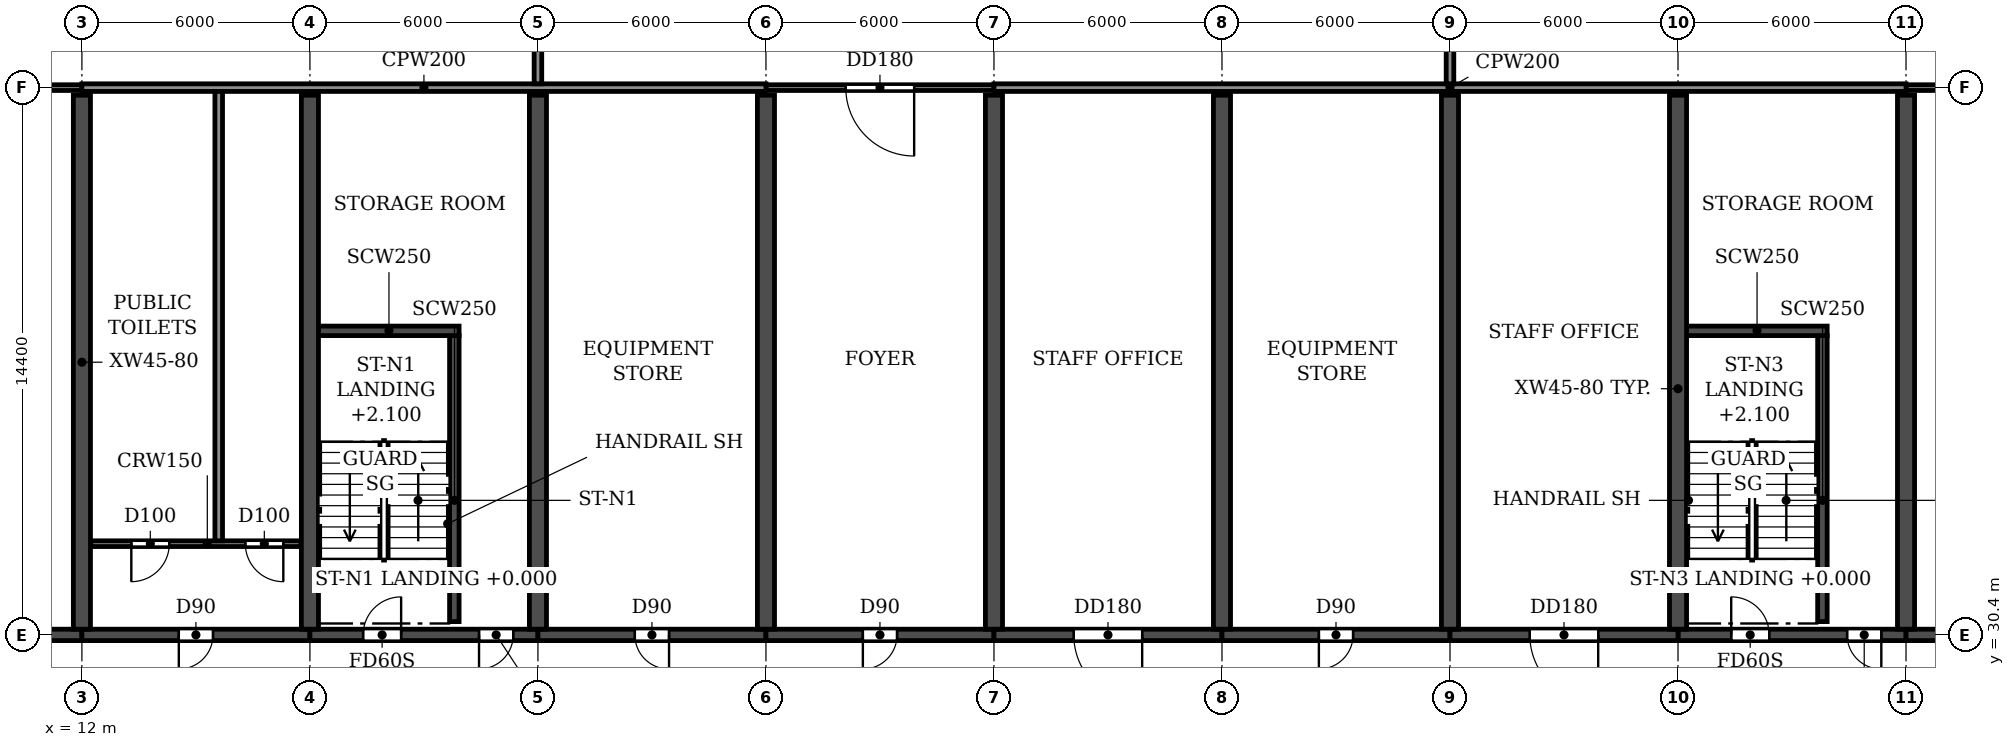
"""IFC4 building model, lengths in metres.
Left out: names, types, materials, properties, quantities, classifications, styles, units other than length and angle.
Written with IfcOpenShell. Run it as: python <this file> out.ifc"""

import sys

from ifc_helpers import new_model, si_unit, direction, frame, frame_2d, origin, place, context, subcontext, project, spatial, rectangle, extrude, element, fill, save


model = new_model("IFC4")
c1 = context("Model", 3, precision=1e-05, world=origin(), true_north=direction((0.0, 1.0)))
c2 = subcontext(c1, "Body", "Model", "MODEL_VIEW")
j1 = project(units=[si_unit("LENGTHUNIT", "METRE"), si_unit("PLANEANGLEUNIT", "RADIAN")], contexts=[c1])
p1 = place(None, origin())
s1 = spatial("IfcSite", under=j1, at=p1, CompositionType="ELEMENT")
p2 = place(p1, origin())
s2 = spatial("IfcBuilding", under=s1, at=p2, CompositionType="ELEMENT")
p3 = place(p2, frame((0.0, 0.0, 15.0)))
s3 = spatial("IfcBuildingStorey", under=s2, at=p3, CompositionType="ELEMENT", Elevation=15.0)
for number, where, z_axis, x_axis in (
    (1, (12.0, 30.55, 0.0), (0.0, 0.0, 1.0), (0.0, 1.0, 0.0)),
    (2, (18.0, 30.55, 0.0), (0.0, 0.0, 1.0), (0.0, 1.0, 0.0)),
    (3, (24.0, 30.55, 0.0), (0.0, 0.0, 1.0), (0.0, 1.0, 0.0)),
    (4, (30.0, 30.55, 0.0), (0.0, 0.0, 1.0), (0.0, 1.0, 0.0)),
    (5, (36.0, 30.55, 0.0), (0.0, 0.0, 1.0), (0.0, 1.0, 0.0)),
    (6, (42.0, 30.55, 0.0), (0.0, 0.0, 1.0), (0.0, 1.0, 0.0)),
    (7, (48.0, 30.55, 0.0), (0.0, 0.0, 1.0), (0.0, 1.0, 0.0)),
    (8, (54.0, 30.55, 0.0), (0.0, 0.0, 1.0), (0.0, 1.0, 0.0)),
    (9, (60.0, 30.55, 0.0), (0.0, 0.0, 1.0), (0.0, 1.0, 0.0)),
):
    element("IfcWall", number, at=place(p3, frame(where, z_axis=z_axis, x_axis=x_axis)), inside=s3, PredefinedType="SHEAR", context=c2, shape_type="SweptSolid", body=[
        extrude(rectangle(XDim=14.05, YDim=0.45, at=frame_2d((7.025, 0.0))), origin(), (0.0, 0.0, 1.0), 3.92),
    ])
p4 = place(p3, frame((6.0, 30.4, 0.0), z_axis=(0.0, 0.0, 1.0), x_axis=(1.0, 0.0, 0.0)))
e10 = element("IfcWall", 10, at=p4, inside=s3, PredefinedType="SHEAR", context=c2, shape_type="SweptSolid", body=[
    extrude(rectangle(XDim=6.0, YDim=0.3, at=frame_2d((3.0, 0.0))), origin(), (0.0, 0.0, 1.0), 3.32),
])
p5 = place(p4, frame((2.55, 0.0, 0.0)))
e11 = element("IfcOpeningElement", 11, at=p5, cuts=e10, PredefinedType="OPENING", context=c2, shape_type="SweptSolid", body=[
    extrude(rectangle(XDim=0.9, YDim=2.1, at=frame_2d((0.45, 1.05))), frame((0.0, 0.16, 0.0), z_axis=(0.0, -1.0, 0.0), x_axis=(1.0, 0.0, 0.0)), (0.0, 0.0, 1.0), 0.32),
])
p6 = place(p3, frame((12.0, 30.4, 0.0), z_axis=(0.0, 0.0, 1.0), x_axis=(1.0, 0.0, 0.0)))
e12 = element("IfcWall", 12, at=p6, inside=s3, PredefinedType="SHEAR", context=c2, shape_type="SweptSolid", body=[
    extrude(rectangle(XDim=6.0, YDim=0.3, at=frame_2d((3.0, 0.0))), origin(), (0.0, 0.0, 1.0), 3.32),
])
p7 = place(p6, frame((2.55, 0.0, 0.0)))
e13 = element("IfcOpeningElement", 13, at=p7, cuts=e12, PredefinedType="OPENING", context=c2, shape_type="SweptSolid", body=[
    extrude(rectangle(XDim=0.9, YDim=2.1, at=frame_2d((0.45, 1.05))), frame((0.0, 0.16, 0.0), z_axis=(0.0, -1.0, 0.0), x_axis=(1.0, 0.0, 0.0)), (0.0, 0.0, 1.0), 0.32),
])
p8 = place(p3, frame((18.0, 30.4, 0.0), z_axis=(0.0, 0.0, 1.0), x_axis=(1.0, 0.0, 0.0)))
e14 = element("IfcWall", 14, at=p8, inside=s3, PredefinedType="SHEAR", context=c2, shape_type="SweptSolid", body=[
    extrude(rectangle(XDim=6.0, YDim=0.3, at=frame_2d((3.0, 0.0))), origin(), (0.0, 0.0, 1.0), 3.32),
])
p9 = place(p8, frame((1.4, 0.0, 0.0)))
e15 = element("IfcOpeningElement", 15, at=p9, cuts=e14, PredefinedType="OPENING", context=c2, shape_type="SweptSolid", body=[
    extrude(rectangle(XDim=1.0, YDim=2.1, at=frame_2d((0.5, 1.05))), frame((0.0, 0.16, 0.0), z_axis=(0.0, -1.0, 0.0), x_axis=(1.0, 0.0, 0.0)), (0.0, 0.0, 1.0), 0.32),
])
p10 = place(p8, frame((4.45, 0.0, 0.0)))
e16 = element("IfcOpeningElement", 16, at=p10, cuts=e14, PredefinedType="OPENING", context=c2, shape_type="SweptSolid", body=[
    extrude(rectangle(XDim=0.9, YDim=2.1, at=frame_2d((0.45, 1.05))), frame((0.0, 0.16, 0.0), z_axis=(0.0, -1.0, 0.0), x_axis=(1.0, 0.0, 0.0)), (0.0, 0.0, 1.0), 0.32),
])
p11 = place(p3, frame((24.0, 30.4, 0.0), z_axis=(0.0, 0.0, 1.0), x_axis=(1.0, 0.0, 0.0)))
e17 = element("IfcWall", 17, at=p11, inside=s3, PredefinedType="SHEAR", context=c2, shape_type="SweptSolid", body=[
    extrude(rectangle(XDim=6.0, YDim=0.3, at=frame_2d((3.0, 0.0))), origin(), (0.0, 0.0, 1.0), 3.32),
])
p12 = place(p11, frame((2.55, 0.0, 0.0)))
e18 = element("IfcOpeningElement", 18, at=p12, cuts=e17, PredefinedType="OPENING", context=c2, shape_type="SweptSolid", body=[
    extrude(rectangle(XDim=0.9, YDim=2.1, at=frame_2d((0.45, 1.05))), frame((0.0, 0.16, 0.0), z_axis=(0.0, -1.0, 0.0), x_axis=(1.0, 0.0, 0.0)), (0.0, 0.0, 1.0), 0.32),
])
p13 = place(p3, frame((30.0, 30.4, 0.0), z_axis=(0.0, 0.0, 1.0), x_axis=(1.0, 0.0, 0.0)))
e19 = element("IfcWall", 19, at=p13, inside=s3, PredefinedType="SHEAR", context=c2, shape_type="SweptSolid", body=[
    extrude(rectangle(XDim=6.0, YDim=0.3, at=frame_2d((3.0, 0.0))), origin(), (0.0, 0.0, 1.0), 3.32),
])
p14 = place(p13, frame((2.55, 0.0, 0.0)))
e20 = element("IfcOpeningElement", 20, at=p14, cuts=e19, PredefinedType="OPENING", context=c2, shape_type="SweptSolid", body=[
    extrude(rectangle(XDim=0.9, YDim=2.1, at=frame_2d((0.45, 1.05))), frame((0.0, 0.16, 0.0), z_axis=(0.0, -1.0, 0.0), x_axis=(1.0, 0.0, 0.0)), (0.0, 0.0, 1.0), 0.32),
])
p15 = place(p3, frame((36.0, 30.4, 0.0), z_axis=(0.0, 0.0, 1.0), x_axis=(1.0, 0.0, 0.0)))
e21 = element("IfcWall", 21, at=p15, inside=s3, PredefinedType="SHEAR", context=c2, shape_type="SweptSolid", body=[
    extrude(rectangle(XDim=6.0, YDim=0.3, at=frame_2d((3.0, 0.0))), origin(), (0.0, 0.0, 1.0), 3.32),
])
p16 = place(p15, frame((2.1, 0.0, 0.0)))
e22 = element("IfcOpeningElement", 22, at=p16, cuts=e21, PredefinedType="OPENING", context=c2, shape_type="SweptSolid", body=[
    extrude(rectangle(XDim=1.8, YDim=2.1, at=frame_2d((0.9, 1.05))), frame((0.0, 0.16, 0.0), z_axis=(0.0, -1.0, 0.0), x_axis=(1.0, 0.0, 0.0)), (0.0, 0.0, 1.0), 0.32),
])
p17 = place(p3, frame((42.0, 30.4, 0.0), z_axis=(0.0, 0.0, 1.0), x_axis=(1.0, 0.0, 0.0)))
e23 = element("IfcWall", 23, at=p17, inside=s3, PredefinedType="SHEAR", context=c2, shape_type="SweptSolid", body=[
    extrude(rectangle(XDim=6.0, YDim=0.3, at=frame_2d((3.0, 0.0))), origin(), (0.0, 0.0, 1.0), 3.32),
])
p18 = place(p17, frame((2.55, 0.0, 0.0)))
e24 = element("IfcOpeningElement", 24, at=p18, cuts=e23, PredefinedType="OPENING", context=c2, shape_type="SweptSolid", body=[
    extrude(rectangle(XDim=0.9, YDim=2.1, at=frame_2d((0.45, 1.05))), frame((0.0, 0.16, 0.0), z_axis=(0.0, -1.0, 0.0), x_axis=(1.0, 0.0, 0.0)), (0.0, 0.0, 1.0), 0.32),
])
p19 = place(p3, frame((48.0, 30.4, 0.0), z_axis=(0.0, 0.0, 1.0), x_axis=(1.0, 0.0, 0.0)))
e25 = element("IfcWall", 25, at=p19, inside=s3, PredefinedType="SHEAR", context=c2, shape_type="SweptSolid", body=[
    extrude(rectangle(XDim=6.0, YDim=0.3, at=frame_2d((3.0, 0.0))), origin(), (0.0, 0.0, 1.0), 3.32),
])
p20 = place(p19, frame((2.1, 0.0, 0.0)))
e26 = element("IfcOpeningElement", 26, at=p20, cuts=e25, PredefinedType="OPENING", context=c2, shape_type="SweptSolid", body=[
    extrude(rectangle(XDim=1.8, YDim=2.1, at=frame_2d((0.9, 1.05))), frame((0.0, 0.16, 0.0), z_axis=(0.0, -1.0, 0.0), x_axis=(1.0, 0.0, 0.0)), (0.0, 0.0, 1.0), 0.32),
])
p21 = place(p3, frame((54.0, 30.4, 0.0), z_axis=(0.0, 0.0, 1.0), x_axis=(1.0, 0.0, 0.0)))
e27 = element("IfcWall", 27, at=p21, inside=s3, PredefinedType="SHEAR", context=c2, shape_type="SweptSolid", body=[
    extrude(rectangle(XDim=6.0, YDim=0.3, at=frame_2d((3.0, 0.0))), origin(), (0.0, 0.0, 1.0), 3.32),
])
p22 = place(p21, frame((1.4, 0.0, 0.0)))
e28 = element("IfcOpeningElement", 28, at=p22, cuts=e27, PredefinedType="OPENING", context=c2, shape_type="SweptSolid", body=[
    extrude(rectangle(XDim=1.0, YDim=2.1, at=frame_2d((0.5, 1.05))), frame((0.0, 0.16, 0.0), z_axis=(0.0, -1.0, 0.0), x_axis=(1.0, 0.0, 0.0)), (0.0, 0.0, 1.0), 0.32),
])
p23 = place(p21, frame((4.45, 0.0, 0.0)))
e29 = element("IfcOpeningElement", 29, at=p23, cuts=e27, PredefinedType="OPENING", context=c2, shape_type="SweptSolid", body=[
    extrude(rectangle(XDim=0.9, YDim=2.1, at=frame_2d((0.45, 1.05))), frame((0.0, 0.16, 0.0), z_axis=(0.0, -1.0, 0.0), x_axis=(1.0, 0.0, 0.0)), (0.0, 0.0, 1.0), 0.32),
])
p24 = place(p3, frame((60.0, 30.4, 0.0), z_axis=(0.0, 0.0, 1.0), x_axis=(1.0, 0.0, 0.0)))
e30 = element("IfcWall", 30, at=p24, inside=s3, PredefinedType="SHEAR", context=c2, shape_type="SweptSolid", body=[
    extrude(rectangle(XDim=6.0, YDim=0.3, at=frame_2d((3.0, 0.0))), origin(), (0.0, 0.0, 1.0), 3.32),
])
p25 = place(p24, frame((2.55, 0.0, 0.0)))
e31 = element("IfcOpeningElement", 31, at=p25, cuts=e30, PredefinedType="OPENING", context=c2, shape_type="SweptSolid", body=[
    extrude(rectangle(XDim=0.9, YDim=2.1, at=frame_2d((0.45, 1.05))), frame((0.0, 0.16, 0.0), z_axis=(0.0, -1.0, 0.0), x_axis=(1.0, 0.0, 0.0)), (0.0, 0.0, 1.0), 0.32),
])
p26 = place(p3, frame((21.8, 30.75, 0.0), z_axis=(0.0, 0.0, 1.0), x_axis=(0.0, 1.0, 0.0)))
e32 = element("IfcWall", 32, at=p26, inside=s3, PredefinedType="SOLIDWALL", context=c2, shape_type="SweptSolid", body=[
    extrude(rectangle(XDim=7.525, YDim=0.25, at=frame_2d((3.762, 0.0))), origin(), (0.0, 0.0, 1.0), 3.92),
])
p27 = place(p3, frame((18.0, 38.4, 0.0), z_axis=(0.0, 0.0, 1.0), x_axis=(1.0, 0.0, 0.0)))
e33 = element("IfcWall", 33, at=p27, inside=s3, PredefinedType="SOLIDWALL", context=c2, shape_type="SweptSolid", body=[
    extrude(rectangle(XDim=3.925, YDim=0.25, at=frame_2d((1.962, 0.0))), origin(), (0.0, 0.0, 1.0), 3.92),
])
p28 = place(p3, frame((57.8, 30.75, 0.0), z_axis=(0.0, 0.0, 1.0), x_axis=(0.0, 1.0, 0.0)))
e34 = element("IfcWall", 34, at=p28, inside=s3, PredefinedType="SOLIDWALL", context=c2, shape_type="SweptSolid", body=[
    extrude(rectangle(XDim=7.525, YDim=0.25, at=frame_2d((3.762, 0.0))), origin(), (0.0, 0.0, 1.0), 3.92),
])
p29 = place(p3, frame((54.0, 38.4, 0.0), z_axis=(0.0, 0.0, 1.0), x_axis=(1.0, 0.0, 0.0)))
e35 = element("IfcWall", 35, at=p29, inside=s3, PredefinedType="SOLIDWALL", context=c2, shape_type="SweptSolid", body=[
    extrude(rectangle(XDim=3.925, YDim=0.25, at=frame_2d((1.962, 0.0))), origin(), (0.0, 0.0, 1.0), 3.92),
])
p30 = place(p3, frame((12.235, 32.8, 0.0), z_axis=(0.0, 0.0, 1.0), x_axis=(1.0, 0.0, 0.0)))
e36 = element("IfcWall", 36, at=p30, inside=s3, PredefinedType="PARTITIONING", context=c2, shape_type="SweptSolid", body=[
    extrude(rectangle(XDim=5.53, YDim=0.15, at=frame_2d((2.765, 0.0))), origin(), (0.0, 0.0, 1.0), 3.92),
])
p31 = place(p30, frame((1.065, 0.0, 0.0)))
e37 = element("IfcOpeningElement", 37, at=p31, cuts=e36, PredefinedType="OPENING", context=c2, shape_type="SweptSolid", body=[
    extrude(rectangle(XDim=1.0, YDim=2.1, at=frame_2d((0.5, 1.05))), frame((0.0, 0.085, 0.0), z_axis=(0.0, -1.0, 0.0), x_axis=(1.0, 0.0, 0.0)), (0.0, 0.0, 1.0), 0.17),
])
p32 = place(p30, frame((4.065, 0.0, 0.0)))
e38 = element("IfcOpeningElement", 38, at=p32, cuts=e36, PredefinedType="OPENING", context=c2, shape_type="SweptSolid", body=[
    extrude(rectangle(XDim=1.0, YDim=2.1, at=frame_2d((0.5, 1.05))), frame((0.0, 0.085, 0.0), z_axis=(0.0, -1.0, 0.0), x_axis=(1.0, 0.0, 0.0)), (0.0, 0.0, 1.0), 0.17),
])
p33 = place(p3, frame((6.0, 44.8, 0.0), z_axis=(0.0, 0.0, 1.0), x_axis=(1.0, 0.0, 0.0)))
e39 = element("IfcWall", 39, at=p33, inside=s3, PredefinedType="PARTITIONING", context=c2, shape_type="SweptSolid", body=[
    extrude(rectangle(XDim=6.0, YDim=0.15, at=frame_2d((3.0, 0.0))), origin(), (0.0, 0.0, 1.0), 3.92),
])
p34 = place(p33, frame((2.1, 0.0, 0.0)))
e40 = element("IfcOpeningElement", 40, at=p34, cuts=e39, PredefinedType="OPENING", context=c2, shape_type="SweptSolid", body=[
    extrude(rectangle(XDim=1.8, YDim=2.1, at=frame_2d((0.9, 1.05))), frame((0.0, 0.085, 0.0), z_axis=(0.0, -1.0, 0.0), x_axis=(1.0, 0.0, 0.0)), (0.0, 0.0, 1.0), 0.17),
])
p35 = place(p3, frame((30.0, 44.8, 0.0), z_axis=(0.0, 0.0, 1.0), x_axis=(1.0, 0.0, 0.0)))
e41 = element("IfcWall", 41, at=p35, inside=s3, PredefinedType="PARTITIONING", context=c2, shape_type="SweptSolid", body=[
    extrude(rectangle(XDim=6.0, YDim=0.15, at=frame_2d((3.0, 0.0))), origin(), (0.0, 0.0, 1.0), 3.92),
])
p36 = place(p35, frame((2.1, 0.0, 0.0)))
e42 = element("IfcOpeningElement", 42, at=p36, cuts=e41, PredefinedType="OPENING", context=c2, shape_type="SweptSolid", body=[
    extrude(rectangle(XDim=1.8, YDim=2.1, at=frame_2d((0.9, 1.05))), frame((0.0, 0.085, 0.0), z_axis=(0.0, -1.0, 0.0), x_axis=(1.0, 0.0, 0.0)), (0.0, 0.0, 1.0), 0.17),
])
p37 = place(p3, frame((60.0, 44.8, 0.0), z_axis=(0.0, 0.0, 1.0), x_axis=(1.0, 0.0, 0.0)))
e43 = element("IfcWall", 43, at=p37, inside=s3, PredefinedType="PARTITIONING", context=c2, shape_type="SweptSolid", body=[
    extrude(rectangle(XDim=6.0, YDim=0.15, at=frame_2d((3.0, 0.0))), origin(), (0.0, 0.0, 1.0), 3.92),
])
p38 = place(p37, frame((2.1, 0.0, 0.0)))
e44 = element("IfcOpeningElement", 44, at=p38, cuts=e43, PredefinedType="OPENING", context=c2, shape_type="SweptSolid", body=[
    extrude(rectangle(XDim=1.8, YDim=2.1, at=frame_2d((0.9, 1.05))), frame((0.0, 0.085, 0.0), z_axis=(0.0, -1.0, 0.0), x_axis=(1.0, 0.0, 0.0)), (0.0, 0.0, 1.0), 0.17),
])
p39 = place(p3, frame((12.0, 44.8, 0.0), z_axis=(0.0, 0.0, 1.0), x_axis=(1.0, 0.0, 0.0)))
e45 = element("IfcWall", 45, at=p39, inside=s3, PredefinedType="PARTITIONING", context=c2, shape_type="SweptSolid", body=[
    extrude(rectangle(XDim=18.0, YDim=0.2, at=frame_2d((9.0, 0.0))), origin(), (0.0, 0.0, 1.0), 3.92),
])
p40 = place(p3, frame((36.0, 44.8, 0.0), z_axis=(0.0, 0.0, 1.0), x_axis=(1.0, 0.0, 0.0)))
e46 = element("IfcWall", 46, at=p40, inside=s3, PredefinedType="PARTITIONING", context=c2, shape_type="SweptSolid", body=[
    extrude(rectangle(XDim=24.0, YDim=0.2, at=frame_2d((12.0, 0.0))), origin(), (0.0, 0.0, 1.0), 3.92),
])
p41 = place(p3, frame((15.6, 32.875, 0.0), z_axis=(0.0, 0.0, 1.0), x_axis=(0.0, 1.0, 0.0)))
e47 = element("IfcWall", 47, at=p41, inside=s3, PredefinedType="PARTITIONING", context=c2, shape_type="SweptSolid", body=[
    extrude(rectangle(XDim=11.825, YDim=0.2, at=frame_2d((5.913, 0.0))), origin(), (0.0, 0.0, 1.0), 3.92),
])
for number, where, z_axis, x_axis in (
    (48, (24.0, 44.9, 0.0), (0.0, 0.0, 1.0), (0.0, 1.0, 0.0)),
    (49, (48.0, 44.9, 0.0), (0.0, 0.0, 1.0), (0.0, 1.0, 0.0)),
):
    element("IfcWall", number, at=place(p3, frame(where, z_axis=z_axis, x_axis=x_axis)), inside=s3, PredefinedType="PARTITIONING", context=c2, shape_type="SweptSolid", body=[
        extrude(rectangle(XDim=11.84, YDim=0.2, at=frame_2d((5.92, 0.0))), origin(), (0.0, 0.0, 1.0), 3.92),
    ])
p42 = place(p7, frame((0.9, 0.0, 0.0), z_axis=(0.0, 0.0, 1.0), x_axis=(-1.0, 0.0, 0.0)))
e50 = element("IfcDoor", 50, at=p42, inside=s3, OperationType="SINGLE_SWING_RIGHT", PredefinedType="DOOR", context=c2, shape_type="SweptSolid", body=[
    extrude(rectangle(XDim=0.9, YDim=2.1, at=frame_2d((0.45, 1.05))), frame((0.0, 0.025, 0.0), z_axis=(0.0, -1.0, 0.0), x_axis=(1.0, 0.0, 0.0)), (0.0, 0.0, 1.0), 0.05),
])
fill(e13, e50)
p43 = place(p9, origin())
e51 = element("IfcDoor", 51, at=p43, inside=s3, OperationType="SINGLE_SWING_RIGHT", PredefinedType="DOOR", context=c2, shape_type="SweptSolid", body=[
    extrude(rectangle(XDim=1.0, YDim=2.1, at=frame_2d((0.5, 1.05))), frame((0.0, 0.025, 0.0), z_axis=(0.0, -1.0, 0.0), x_axis=(1.0, 0.0, 0.0)), (0.0, 0.0, 1.0), 0.05),
])
fill(e15, e51)
p44 = place(p10, frame((0.9, 0.0, 0.0), z_axis=(0.0, 0.0, 1.0), x_axis=(-1.0, 0.0, 0.0)))
e52 = element("IfcDoor", 52, at=p44, inside=s3, OperationType="SINGLE_SWING_RIGHT", PredefinedType="DOOR", context=c2, shape_type="SweptSolid", body=[
    extrude(rectangle(XDim=0.9, YDim=2.1, at=frame_2d((0.45, 1.05))), frame((0.0, 0.025, 0.0), z_axis=(0.0, -1.0, 0.0), x_axis=(1.0, 0.0, 0.0)), (0.0, 0.0, 1.0), 0.05),
])
fill(e16, e52)
p45 = place(p12, frame((0.9, 0.0, 0.0), z_axis=(0.0, 0.0, 1.0), x_axis=(-1.0, 0.0, 0.0)))
e53 = element("IfcDoor", 53, at=p45, inside=s3, OperationType="SINGLE_SWING_LEFT", PredefinedType="DOOR", context=c2, shape_type="SweptSolid", body=[
    extrude(rectangle(XDim=0.9, YDim=2.1, at=frame_2d((0.45, 1.05))), frame((0.0, 0.025, 0.0), z_axis=(0.0, -1.0, 0.0), x_axis=(1.0, 0.0, 0.0)), (0.0, 0.0, 1.0), 0.05),
])
fill(e18, e53)
p46 = place(p14, frame((0.9, 0.0, 0.0), z_axis=(0.0, 0.0, 1.0), x_axis=(-1.0, 0.0, 0.0)))
e54 = element("IfcDoor", 54, at=p46, inside=s3, OperationType="SINGLE_SWING_RIGHT", PredefinedType="DOOR", context=c2, shape_type="SweptSolid", body=[
    extrude(rectangle(XDim=0.9, YDim=2.1, at=frame_2d((0.45, 1.05))), frame((0.0, 0.025, 0.0), z_axis=(0.0, -1.0, 0.0), x_axis=(1.0, 0.0, 0.0)), (0.0, 0.0, 1.0), 0.05),
])
fill(e20, e54)
p47 = place(p16, frame((1.8, 0.0, 0.0), z_axis=(0.0, 0.0, 1.0), x_axis=(-1.0, 0.0, 0.0)))
e55 = element("IfcDoor", 55, at=p47, inside=s3, OperationType="DOUBLE_DOOR_SINGLE_SWING", PredefinedType="DOOR", context=c2, shape_type="SweptSolid", body=[
    extrude(rectangle(XDim=1.8, YDim=2.1, at=frame_2d((0.9, 1.05))), frame((0.0, 0.025, 0.0), z_axis=(0.0, -1.0, 0.0), x_axis=(1.0, 0.0, 0.0)), (0.0, 0.0, 1.0), 0.05),
])
fill(e22, e55)
p48 = place(p18, frame((0.9, 0.0, 0.0), z_axis=(0.0, 0.0, 1.0), x_axis=(-1.0, 0.0, 0.0)))
e56 = element("IfcDoor", 56, at=p48, inside=s3, OperationType="SINGLE_SWING_RIGHT", PredefinedType="DOOR", context=c2, shape_type="SweptSolid", body=[
    extrude(rectangle(XDim=0.9, YDim=2.1, at=frame_2d((0.45, 1.05))), frame((0.0, 0.025, 0.0), z_axis=(0.0, -1.0, 0.0), x_axis=(1.0, 0.0, 0.0)), (0.0, 0.0, 1.0), 0.05),
])
fill(e24, e56)
p49 = place(p20, frame((1.8, 0.0, 0.0), z_axis=(0.0, 0.0, 1.0), x_axis=(-1.0, 0.0, 0.0)))
e57 = element("IfcDoor", 57, at=p49, inside=s3, OperationType="DOUBLE_DOOR_SINGLE_SWING", PredefinedType="DOOR", context=c2, shape_type="SweptSolid", body=[
    extrude(rectangle(XDim=1.8, YDim=2.1, at=frame_2d((0.9, 1.05))), frame((0.0, 0.025, 0.0), z_axis=(0.0, -1.0, 0.0), x_axis=(1.0, 0.0, 0.0)), (0.0, 0.0, 1.0), 0.05),
])
fill(e26, e57)
p50 = place(p22, origin())
e58 = element("IfcDoor", 58, at=p50, inside=s3, OperationType="SINGLE_SWING_LEFT", PredefinedType="DOOR", context=c2, shape_type="SweptSolid", body=[
    extrude(rectangle(XDim=1.0, YDim=2.1, at=frame_2d((0.5, 1.05))), frame((0.0, 0.025, 0.0), z_axis=(0.0, -1.0, 0.0), x_axis=(1.0, 0.0, 0.0)), (0.0, 0.0, 1.0), 0.05),
])
fill(e28, e58)
p51 = place(p23, frame((0.9, 0.0, 0.0), z_axis=(0.0, 0.0, 1.0), x_axis=(-1.0, 0.0, 0.0)))
e59 = element("IfcDoor", 59, at=p51, inside=s3, OperationType="SINGLE_SWING_LEFT", PredefinedType="DOOR", context=c2, shape_type="SweptSolid", body=[
    extrude(rectangle(XDim=0.9, YDim=2.1, at=frame_2d((0.45, 1.05))), frame((0.0, 0.025, 0.0), z_axis=(0.0, -1.0, 0.0), x_axis=(1.0, 0.0, 0.0)), (0.0, 0.0, 1.0), 0.05),
])
fill(e29, e59)
p52 = place(p31, frame((1.0, 0.0, 0.0), z_axis=(0.0, 0.0, 1.0), x_axis=(-1.0, 0.0, 0.0)))
e60 = element("IfcDoor", 60, at=p52, inside=s3, OperationType="SINGLE_SWING_RIGHT", PredefinedType="DOOR", context=c2, shape_type="SweptSolid", body=[
    extrude(rectangle(XDim=1.0, YDim=2.1, at=frame_2d((0.5, 1.05))), frame((0.0, 0.025, 0.0), z_axis=(0.0, -1.0, 0.0), x_axis=(1.0, 0.0, 0.0)), (0.0, 0.0, 1.0), 0.05),
])
fill(e37, e60)
p53 = place(p32, frame((1.0, 0.0, 0.0), z_axis=(0.0, 0.0, 1.0), x_axis=(-1.0, 0.0, 0.0)))
e61 = element("IfcDoor", 61, at=p53, inside=s3, OperationType="SINGLE_SWING_LEFT", PredefinedType="DOOR", context=c2, shape_type="SweptSolid", body=[
    extrude(rectangle(XDim=1.0, YDim=2.1, at=frame_2d((0.5, 1.05))), frame((0.0, 0.025, 0.0), z_axis=(0.0, -1.0, 0.0), x_axis=(1.0, 0.0, 0.0)), (0.0, 0.0, 1.0), 0.05),
])
fill(e38, e61)
p54 = place(p36, frame((1.8, 0.0, 0.0), z_axis=(0.0, 0.0, 1.0), x_axis=(-1.0, 0.0, 0.0)))
e62 = element("IfcDoor", 62, at=p54, inside=s3, OperationType="DOUBLE_DOOR_SINGLE_SWING", PredefinedType="DOOR", context=c2, shape_type="SweptSolid", body=[
    extrude(rectangle(XDim=1.8, YDim=2.1, at=frame_2d((0.9, 1.05))), frame((0.0, 0.025, 0.0), z_axis=(0.0, -1.0, 0.0), x_axis=(1.0, 0.0, 0.0)), (0.0, 0.0, 1.0), 0.05),
])
fill(e42, e62)
save(model, sys.argv[1])
